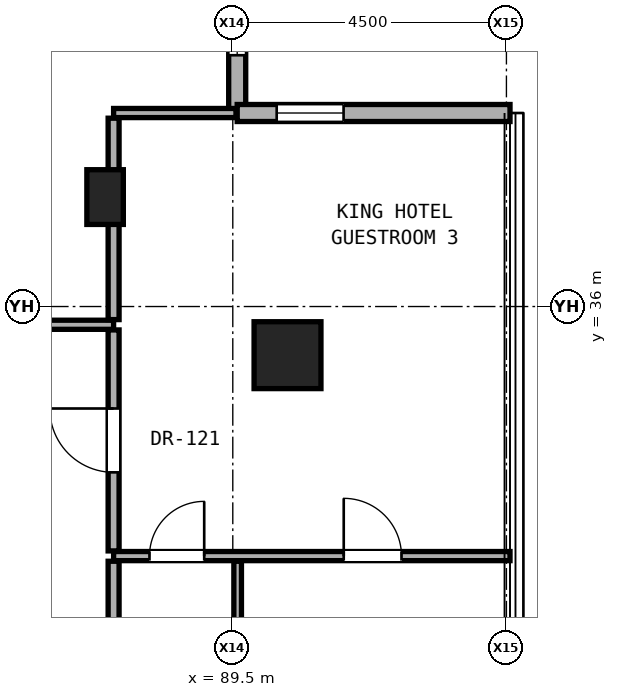
"""IFC4 building model, lengths in metres.
Left out: names, types, materials, properties, quantities, classifications, styles, units other than length and angle.
Written with IfcOpenShell. Run it as: python <this file> out.ifc"""

import sys

from ifc_helpers import new_model, si_unit, direction, frame, frame_2d, origin, origin_2d, place, context, subcontext, project, spatial, rectangle, hollow_rectangle, extrude, element, fill, save


model = new_model("IFC4")
c1 = context("Model", 3, precision=1e-05, world=origin(), true_north=direction((0.0, 1.0)))
c2 = subcontext(c1, "Body", "Model", "MODEL_VIEW")
j1 = project(units=[si_unit("LENGTHUNIT", "METRE"), si_unit("PLANEANGLEUNIT", "RADIAN")], contexts=[c1])
p1 = place(None, origin())
s1 = spatial("IfcSite", under=j1, at=p1, CompositionType="ELEMENT")
p2 = place(p1, origin())
s2 = spatial("IfcBuilding", under=s1, at=p2, CompositionType="ELEMENT")
p3 = place(p2, frame((0.0, 0.0, 128.0)))
s3 = spatial("IfcBuildingStorey", under=s2, at=p3, CompositionType="ELEMENT", Elevation=128.0)
p4 = place(p3, frame((90.4, 35.2, 0.0), z_axis=(0.0, 0.0, 1.0), x_axis=(1.0, 0.0, 0.0)))
e1 = element("IfcColumn", 1, at=p4, inside=s3, PredefinedType="COLUMN", context=c2, shape_type="SweptSolid", body=[
    extrude(hollow_rectangle(XDim=1.1, YDim=1.1, WallThickness=0.06, at=origin_2d()), origin(), (0.0, 0.0, 1.0), 3.3),
])
p5 = place(p3, frame((87.4, 37.8, 0.0), z_axis=(0.0, 0.0, 1.0), x_axis=(1.0, 0.0, 0.0)))
e2 = element("IfcColumn", 2, at=p5, inside=s3, PredefinedType="PILASTER", context=c2, shape_type="SweptSolid", body=[
    extrude(rectangle(XDim=0.6, YDim=0.9, at=origin_2d()), origin(), (0.0, 0.0, 1.0), 3.3),
])
p6 = place(p3, frame((89.573, 39.182, 0.0), z_axis=(0.0, 0.0, 1.0), x_axis=(0.0, 1.0, 0.0)))
e3 = element("IfcWall", 3, at=p6, inside=s3, PredefinedType="SOLIDWALL", context=c2, shape_type="SweptSolid", body=[
    extrude(rectangle(XDim=4.487, YDim=0.28, at=frame_2d((2.243, 0.0))), origin(), (0.0, 0.0, 1.0), 3.06),
])
p7 = place(p6, frame((0.95, 0.0, 0.85)))
e4 = element("IfcOpeningElement", 4, at=p7, cuts=e3, PredefinedType="OPENING", context=c2, shape_type="SweptSolid", body=[
    extrude(rectangle(XDim=1.1, YDim=2.0, at=frame_2d((0.55, 1.0))), frame((0.0, 0.15, 0.0), z_axis=(0.0, -1.0, 0.0), x_axis=(1.0, 0.0, 0.0)), (0.0, 0.0, 1.0), 0.3),
])
p8 = place(p3, frame((94.059, 39.182, 0.0), z_axis=(0.0, 0.0, 1.0), x_axis=(-1.0, 0.0, 0.0)))
e5 = element("IfcWall", 5, at=p8, inside=s3, PredefinedType="SOLIDWALL", context=c2, shape_type="SweptSolid", body=[
    extrude(rectangle(XDim=4.487, YDim=0.28, at=frame_2d((2.243, 0.0))), origin(), (0.0, 0.0, 1.0), 3.06),
])
p9 = place(p8, frame((2.737, 0.0, 0.85)))
e6 = element("IfcOpeningElement", 6, at=p9, cuts=e5, PredefinedType="OPENING", context=c2, shape_type="SweptSolid", body=[
    extrude(rectangle(XDim=1.1, YDim=2.0, at=frame_2d((0.55, 1.0))), frame((0.0, 0.15, 0.0), z_axis=(0.0, -1.0, 0.0), x_axis=(1.0, 0.0, 0.0)), (0.0, 0.0, 1.0), 0.3),
])
p10 = place(p3, frame((87.54, 31.896, 0.0), z_axis=(0.0, 0.0, 1.0), x_axis=(1.0, 0.0, 0.0)))
e7 = element("IfcWall", 7, at=p10, inside=s3, PredefinedType="PARTITIONING", context=c2, shape_type="SweptSolid", body=[
    extrude(rectangle(XDim=6.519, YDim=0.15, at=frame_2d((3.26, 0.0))), origin(), (0.0, 0.0, 1.0), 2.299),
])
p11 = place(p10, frame((3.784, 0.0, 0.0)))
e8 = element("IfcOpeningElement", 8, at=p11, cuts=e7, PredefinedType="OPENING", context=c2, shape_type="SweptSolid", body=[
    extrude(rectangle(XDim=0.95, YDim=2.15, at=frame_2d((0.475, 1.075))), frame((0.0, 0.085, 0.0), z_axis=(0.0, -1.0, 0.0), x_axis=(1.0, 0.0, 0.0)), (0.0, 0.0, 1.0), 0.17),
])
p12 = place(p10, frame((0.59, 0.0, 0.0)))
e9 = element("IfcOpeningElement", 9, at=p12, cuts=e7, PredefinedType="OPENING", context=c2, shape_type="SweptSolid", body=[
    extrude(rectangle(XDim=0.9, YDim=2.1, at=frame_2d((0.45, 1.05))), frame((0.0, 0.085, 0.0), z_axis=(0.0, -1.0, 0.0), x_axis=(1.0, 0.0, 0.0)), (0.0, 0.0, 1.0), 0.17),
])
p13 = place(p3, frame((86.18, 35.7, 0.0), z_axis=(0.0, 0.0, 1.0), x_axis=(1.0, 0.0, 0.0)))
e10 = element("IfcWall", 10, at=p13, inside=s3, PredefinedType="PARTITIONING", context=c2, shape_type="SweptSolid", body=[
    extrude(rectangle(XDim=1.36, YDim=0.15, at=frame_2d((0.68, 0.0))), origin(), (0.0, 0.0, 1.0), 3.08),
])
p14 = place(p3, frame((87.54, 39.182, 0.0), z_axis=(0.0, 0.0, 1.0), x_axis=(1.0, 0.0, 0.0)))
e11 = element("IfcWall", 11, at=p14, inside=s3, PredefinedType="PARTITIONING", context=c2, shape_type="SweptSolid", body=[
    extrude(rectangle(XDim=2.012, YDim=0.15, at=frame_2d((1.006, 0.0))), origin(), (0.0, 0.0, 1.0), 3.08),
])
p15 = place(p3, frame((87.54, 29.681, 0.0), z_axis=(0.0, 0.0, 1.0), x_axis=(0.0, 1.0, 0.0)))
e12 = element("IfcWall", 12, at=p15, inside=s3, PredefinedType="PARTITIONING", context=c2, shape_type="SweptSolid", body=[
    extrude(rectangle(XDim=2.13, YDim=0.18, at=frame_2d((1.065, 0.0))), origin(), (0.0, 0.0, 1.0), 3.08),
])
p16 = place(p3, frame((87.54, 31.981, 0.0), z_axis=(0.0, 0.0, 1.0), x_axis=(0.0, 1.0, 0.0)))
e13 = element("IfcWall", 13, at=p16, inside=s3, PredefinedType="PARTITIONING", context=c2, shape_type="SweptSolid", body=[
    extrude(rectangle(XDim=3.634, YDim=0.18, at=frame_2d((1.817, 0.0))), origin(), (0.0, 0.0, 1.0), 2.472),
])
p17 = place(p16, frame((1.292, 0.0, 0.0)))
e14 = element("IfcOpeningElement", 14, at=p17, cuts=e13, PredefinedType="OPENING", context=c2, shape_type="SweptSolid", body=[
    extrude(rectangle(XDim=1.05, YDim=2.2, at=frame_2d((0.525, 1.1))), frame((0.0, 0.1, 0.0), z_axis=(0.0, -1.0, 0.0), x_axis=(1.0, 0.0, 0.0)), (0.0, 0.0, 1.0), 0.2),
])
p18 = place(p3, frame((87.54, 35.785, 0.0), z_axis=(0.0, 0.0, 1.0), x_axis=(0.0, 1.0, 0.0)))
e15 = element("IfcWall", 15, at=p18, inside=s3, PredefinedType="PARTITIONING", context=c2, shape_type="SweptSolid", body=[
    extrude(rectangle(XDim=3.312, YDim=0.18, at=frame_2d((1.656, 0.0))), origin(), (0.0, 0.0, 1.0), 2.523),
])
p19 = place(p3, frame((89.58, 29.681, 0.0), z_axis=(0.0, 0.0, 1.0), x_axis=(0.0, 1.0, 0.0)))
e16 = element("IfcWall", 16, at=p19, inside=s3, PredefinedType="PARTITIONING", context=c2, shape_type="SweptSolid", body=[
    extrude(rectangle(XDim=2.13, YDim=0.125, at=frame_2d((1.065, 0.0))), origin(), (0.0, 0.0, 1.0), 3.08),
])
p20 = place(p7, origin())
e17 = element("IfcWindow", 17, at=p20, inside=s3, PartitioningType="SINGLE_PANEL", PredefinedType="WINDOW", context=c2, shape_type="SweptSolid", body=[
    extrude(rectangle(XDim=1.1, YDim=2.0, at=frame_2d((0.55, 1.0))), frame((0.0, 0.03, 0.0), z_axis=(0.0, -1.0, 0.0), x_axis=(1.0, 0.0, 0.0)), (0.0, 0.0, 1.0), 0.06),
])
fill(e4, e17)
p21 = place(p9, origin())
e18 = element("IfcWindow", 18, at=p21, inside=s3, PartitioningType="SINGLE_PANEL", PredefinedType="WINDOW", context=c2, shape_type="SweptSolid", body=[
    extrude(rectangle(XDim=1.1, YDim=2.0, at=frame_2d((0.55, 1.0))), frame((0.0, 0.03, 0.0), z_axis=(0.0, -1.0, 0.0), x_axis=(1.0, 0.0, 0.0)), (0.0, 0.0, 1.0), 0.06),
])
fill(e6, e18)
p22 = place(p17, origin())
e19 = element("IfcDoor", 19, at=p22, inside=s3, OperationType="SINGLE_SWING_RIGHT", PredefinedType="DOOR", context=c2, shape_type="SweptSolid", body=[
    extrude(rectangle(XDim=1.05, YDim=2.2, at=frame_2d((0.525, 1.1))), frame((0.0, 0.025, 0.0), z_axis=(0.0, -1.0, 0.0), x_axis=(1.0, 0.0, 0.0)), (0.0, 0.0, 1.0), 0.05),
])
fill(e14, e19)
p23 = place(p11, origin())
e20 = element("IfcDoor", 20, at=p23, inside=s3, OperationType="SINGLE_SWING_LEFT", PredefinedType="DOOR", context=c2, shape_type="SweptSolid", body=[
    extrude(rectangle(XDim=0.95, YDim=2.15, at=frame_2d((0.475, 1.075))), frame((0.0, 0.025, 0.0), z_axis=(0.0, -1.0, 0.0), x_axis=(1.0, 0.0, 0.0)), (0.0, 0.0, 1.0), 0.05),
])
fill(e8, e20)
p24 = place(p12, origin())
e21 = element("IfcDoor", 21, at=p24, inside=s3, OperationType="SINGLE_SWING_RIGHT", PredefinedType="DOOR", context=c2, shape_type="SweptSolid", body=[
    extrude(rectangle(XDim=0.9, YDim=2.1, at=frame_2d((0.45, 1.05))), frame((0.0, 0.025, 0.0), z_axis=(0.0, -1.0, 0.0), x_axis=(1.0, 0.0, 0.0)), (0.0, 0.0, 1.0), 0.05),
])
fill(e9, e21)
save(model, sys.argv[1])
